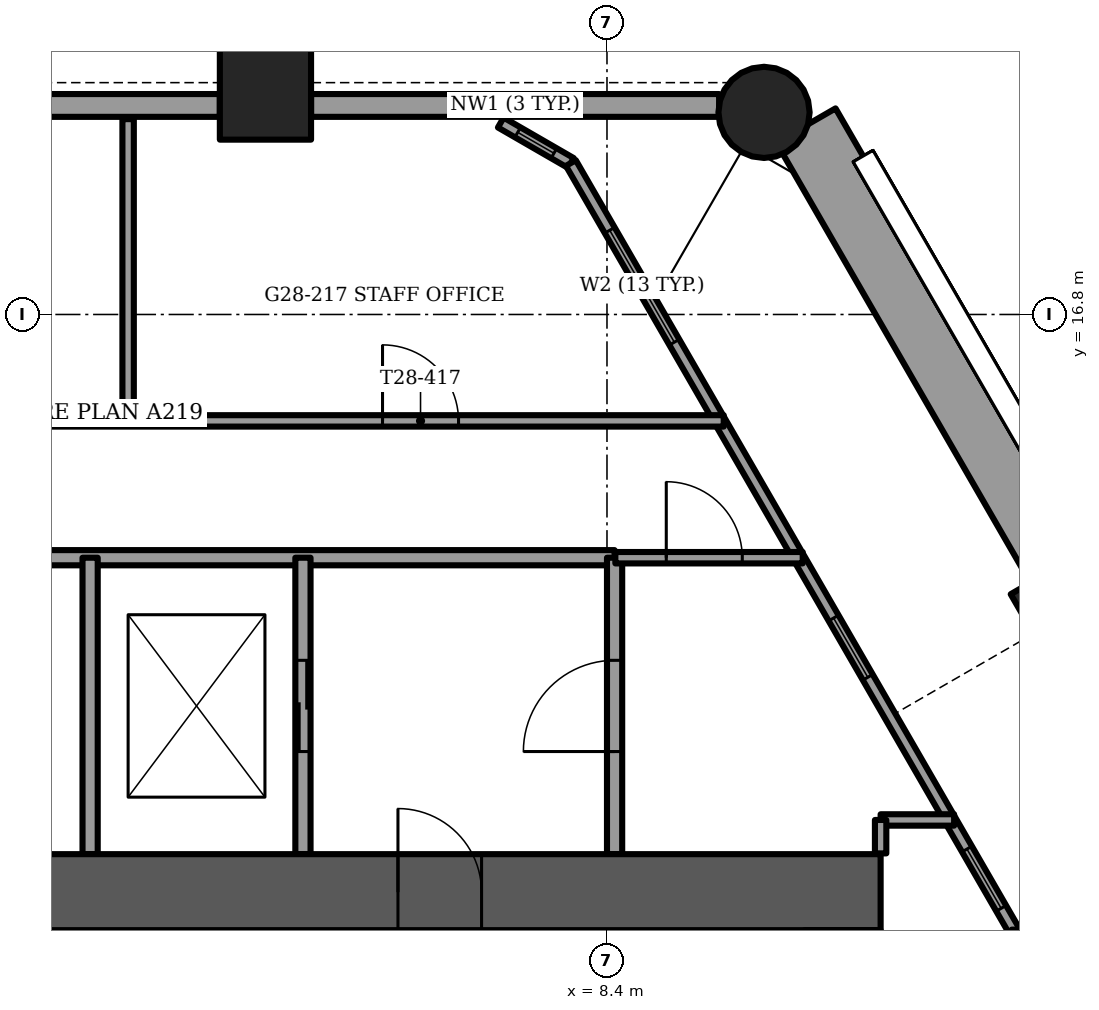
"""IFC4 building model, lengths in metres.
Left out: names, types, materials, properties, quantities, classifications, styles, units other than length and angle.
Written with IfcOpenShell. Run it as: python <this file> out.ifc"""

import sys

from ifc_helpers import new_model, si_unit, direction, frame, frame_2d, origin, origin_2d, place, context, subcontext, project, spatial, rectangle, circle, extrude, element, fill, save


model = new_model("IFC4")
c1 = context("Model", 3, precision=1e-05, world=origin(), true_north=direction((0.0, 1.0)))
c2 = subcontext(c1, "Body", "Model", "MODEL_VIEW")
j1 = project(units=[si_unit("LENGTHUNIT", "METRE"), si_unit("PLANEANGLEUNIT", "RADIAN")], contexts=[c1])
p1 = place(None, origin())
s1 = spatial("IfcSite", under=j1, at=p1, CompositionType="ELEMENT")
p2 = place(p1, origin())
s2 = spatial("IfcBuilding", under=s1, at=p2, CompositionType="ELEMENT")
p3 = place(p2, frame((0.0, 0.0, 116.0)))
s3 = spatial("IfcBuildingStorey", under=s2, at=p3, CompositionType="ELEMENT", Elevation=116.0)
p4 = place(p3, frame((10.466, 19.459, -1.2), z_axis=(0.0, 0.0, 1.0), x_axis=(1.0, 0.0, 0.0)))
e1 = element("IfcColumn", 1, at=p4, inside=s3, PredefinedType="COLUMN", context=c2, shape_type="SweptSolid", body=[
    extrude(circle(Radius=0.6, at=origin_2d()), origin(), (0.0, 0.0, 1.0), 3.75),
])
for number, where, z_axis, x_axis in (
    (2, (3.907, 19.7, -1.2), (0.0, 0.0, 1.0), (1.0, 0.0, 0.0)),
    (3, (14.531, 12.901, -1.2), (0.0, 0.0, 1.0), (0.5, -0.866, 0.0)),
):
    element("IfcColumn", number, at=place(p3, frame(where, z_axis=z_axis, x_axis=x_axis)), inside=s3, PredefinedType="COLUMN", context=c2, shape_type="SweptSolid", body=[
        extrude(rectangle(XDim=1.2, YDim=1.2, at=origin_2d()), origin(), (0.0, 0.0, 1.0), 3.75),
    ])
p5 = place(p3, frame((-12.0, 9.2, -0.3), z_axis=(0.0, 0.0, 1.0), x_axis=(1.0, 0.0, 0.0)))
e4 = element("IfcWall", 4, at=p5, inside=s3, PredefinedType="SHEAR", context=c2, shape_type="SweptSolid", body=[
    extrude(rectangle(XDim=24.0, YDim=1.0, at=frame_2d((12.0, 0.0))), origin(), (0.0, 0.0, 1.0), 3.75),
])
p6 = place(p5, frame((11.2, 0.0, 0.0)))
e5 = element("IfcOpeningElement", 5, at=p6, cuts=e4, PredefinedType="OPENING", context=c2, shape_type="SweptSolid", body=[
    extrude(rectangle(XDim=1.6, YDim=2.1, at=frame_2d((0.8, 1.05))), frame((0.0, 0.5, 0.0), z_axis=(0.0, -1.0, 0.0), x_axis=(1.0, 0.0, 0.0)), (0.0, 0.0, 1.0), 1.0),
])
p7 = place(p5, frame((5.25, 0.0, 0.0)))
e6 = element("IfcOpeningElement", 6, at=p7, cuts=e4, PredefinedType="OPENING", context=c2, shape_type="SweptSolid", body=[
    extrude(rectangle(XDim=1.1, YDim=2.1, at=frame_2d((0.55, 1.05))), frame((0.0, 0.5, 0.0), z_axis=(0.0, -1.0, 0.0), x_axis=(1.0, 0.0, 0.0)), (0.0, 0.0, 1.0), 1.0),
])
p8 = place(p5, frame((17.65, 0.0, 0.0)))
e7 = element("IfcOpeningElement", 7, at=p8, cuts=e4, PredefinedType="OPENING", context=c2, shape_type="SweptSolid", body=[
    extrude(rectangle(XDim=1.1, YDim=2.1, at=frame_2d((0.55, 1.05))), frame((0.0, 0.5, 0.0), z_axis=(0.0, -1.0, 0.0), x_axis=(1.0, 0.0, 0.0)), (0.0, 0.0, 1.0), 1.0),
])
p9 = place(p3, frame((14.376, 13.469, 0.0), z_axis=(0.0, 0.0, 1.0), x_axis=(-0.500012951941, 0.866017925849, 0.0)))
e8 = element("IfcWall", 8, at=p9, inside=s3, PredefinedType="PARAPET", context=c2, shape_type="SweptSolid", body=[
    extrude(rectangle(XDim=6.717, YDim=0.9, at=frame_2d((3.358, 0.0))), origin(), (0.0, 0.0, 1.0), 1.1),
])
p10 = place(p3, frame((9.875, 19.55, 0.0), z_axis=(0.0, 0.0, 1.0), x_axis=(-1.0, 0.0, 0.0)))
e9 = element("IfcWall", 9, at=p10, inside=s3, PredefinedType="SOLIDWALL", context=c2, shape_type="SweptSolid", body=[
    extrude(rectangle(XDim=5.368, YDim=0.3, at=frame_2d((2.684, 0.0))), origin(), (0.0, 0.0, 1.0), 2.55),
])
p11 = place(p3, frame((3.307, 19.55, 0.0), z_axis=(0.0, 0.0, 1.0), x_axis=(-1.0, 0.0, 0.0)))
e10 = element("IfcWall", 10, at=p11, inside=s3, PredefinedType="SOLIDWALL", context=c2, shape_type="SweptSolid", body=[
    extrude(rectangle(XDim=6.613, YDim=0.3, at=frame_2d((3.307, 0.0))), origin(), (0.0, 0.0, 1.0), 2.55),
])
p12 = place(p11, frame((3.507, 0.0, 0.15)))
e11 = element("IfcOpeningElement", 11, at=p12, cuts=e10, PredefinedType="OPENING", context=c2, shape_type="SweptSolid", body=[
    extrude(rectangle(XDim=0.9, YDim=2.15, at=frame_2d((0.45, 1.075))), frame((0.0, 0.15, 0.0), z_axis=(0.0, -1.0, 0.0), x_axis=(1.0, 0.0, 0.0)), (0.0, 0.0, 1.0), 0.3),
])
p13 = place(p3, frame((18.852, -0.133, 0.0), z_axis=(0.0, 0.0, 1.0), x_axis=(-0.499994842654, 0.866028381359, 0.0)))
e12 = element("IfcWall", 12, at=p13, inside=s3, PredefinedType="SOLIDWALL", context=c2, shape_type="SweptSolid", body=[
    extrude(rectangle(XDim=21.853, YDim=0.15, at=frame_2d((10.927, 0.0))), origin(), (0.0, 0.0, 1.0), 3.45),
])
p14 = place(p13, frame((1.441, 0.0, 0.15)))
e13 = element("IfcOpeningElement", 13, at=p14, cuts=e12, PredefinedType="OPENING", context=c2, shape_type="SweptSolid", body=[
    extrude(rectangle(XDim=1.7, YDim=2.85, at=frame_2d((0.85, 1.425))), frame((0.0, 0.075, 0.0), z_axis=(0.0, -1.0, 0.0), x_axis=(1.0, 0.0, 0.0)), (0.0, 0.0, 1.0), 0.15),
])
p15 = place(p13, frame((3.541, 0.0, 0.15)))
e14 = element("IfcOpeningElement", 14, at=p15, cuts=e12, PredefinedType="OPENING", context=c2, shape_type="SweptSolid", body=[
    extrude(rectangle(XDim=1.5, YDim=2.85, at=frame_2d((0.75, 1.425))), frame((0.0, 0.075, 0.0), z_axis=(0.0, -1.0, 0.0), x_axis=(1.0, 0.0, 0.0)), (0.0, 0.0, 1.0), 0.15),
])
p16 = place(p13, frame((5.641, 0.0, 0.15)))
e15 = element("IfcOpeningElement", 15, at=p16, cuts=e12, PredefinedType="OPENING", context=c2, shape_type="SweptSolid", body=[
    extrude(rectangle(XDim=1.7, YDim=2.85, at=frame_2d((0.85, 1.425))), frame((0.0, 0.075, 0.0), z_axis=(0.0, -1.0, 0.0), x_axis=(1.0, 0.0, 0.0)), (0.0, 0.0, 1.0), 0.15),
])
p17 = place(p13, frame((7.741, 0.0, 0.15)))
e16 = element("IfcOpeningElement", 16, at=p17, cuts=e12, PredefinedType="OPENING", context=c2, shape_type="SweptSolid", body=[
    extrude(rectangle(XDim=1.5, YDim=2.85, at=frame_2d((0.75, 1.425))), frame((0.0, 0.075, 0.0), z_axis=(0.0, -1.0, 0.0), x_axis=(1.0, 0.0, 0.0)), (0.0, 0.0, 1.0), 0.15),
])
p18 = place(p13, frame((10.531, 0.0, 0.15)))
e17 = element("IfcOpeningElement", 17, at=p18, cuts=e12, PredefinedType="OPENING", context=c2, shape_type="SweptSolid", body=[
    extrude(rectangle(XDim=0.9, YDim=2.85, at=frame_2d((0.45, 1.425))), frame((0.0, 0.075, 0.0), z_axis=(0.0, -1.0, 0.0), x_axis=(1.0, 0.0, 0.0)), (0.0, 0.0, 1.0), 0.15),
])
p19 = place(p13, frame((14.041, 0.0, 0.15)))
e18 = element("IfcOpeningElement", 18, at=p19, cuts=e12, PredefinedType="OPENING", context=c2, shape_type="SweptSolid", body=[
    extrude(rectangle(XDim=0.9, YDim=2.85, at=frame_2d((0.45, 1.425))), frame((0.0, 0.075, 0.0), z_axis=(0.0, -1.0, 0.0), x_axis=(1.0, 0.0, 0.0)), (0.0, 0.0, 1.0), 0.15),
])
p20 = place(p13, frame((19.132, 0.0, 0.15)))
e19 = element("IfcOpeningElement", 19, at=p20, cuts=e12, PredefinedType="OPENING", context=c2, shape_type="SweptSolid", body=[
    extrude(rectangle(XDim=1.7, YDim=2.73, at=frame_2d((0.85, 1.365))), frame((0.0, 0.075, 0.0), z_axis=(0.0, -1.0, 0.0), x_axis=(1.0, 0.0, 0.0)), (0.0, 0.0, 1.0), 0.15),
])
p21 = place(p3, frame((7.925, 18.792, 0.0), z_axis=(0.0, 0.0, 1.0), x_axis=(-0.866048165231, 0.499960573946, 0.0)))
e20 = element("IfcWall", 20, at=p21, inside=s3, PredefinedType="SOLIDWALL", context=c2, shape_type="SweptSolid", body=[
    extrude(rectangle(XDim=1.065, YDim=0.15, at=frame_2d((0.532, 0.0))), origin(), (0.0, 0.0, 1.0), 3.45),
])
p22 = place(p21, frame((0.258, 0.0, 0.15)))
e21 = element("IfcOpeningElement", 21, at=p22, cuts=e20, PredefinedType="OPENING", context=c2, shape_type="SweptSolid", body=[
    extrude(rectangle(XDim=0.55, YDim=2.85, at=frame_2d((0.275, 1.425))), frame((0.0, 0.075, 0.0), z_axis=(0.0, -1.0, 0.0), x_axis=(1.0, 0.0, 0.0)), (0.0, 0.0, 1.0), 0.15),
])
p23 = place(p3, frame((-8.5, 13.6, 0.0), z_axis=(0.0, 0.0, 1.0), x_axis=(1.0, 0.0, 0.0)))
e22 = element("IfcWall", 22, at=p23, inside=s3, PredefinedType="PARTITIONING", context=c2, shape_type="SweptSolid", body=[
    extrude(rectangle(XDim=17.0, YDim=0.2, at=frame_2d((8.5, 0.0))), origin(), (0.0, 0.0, 1.0), 3.45),
])
p24 = place(p23, frame((8.0, 0.0, 0.0)))
e23 = element("IfcOpeningElement", 23, at=p24, cuts=e22, PredefinedType="OPENING", context=c2, shape_type="SweptSolid", body=[
    extrude(rectangle(XDim=1.0, YDim=2.1, at=frame_2d((0.5, 1.05))), frame((0.0, 0.1, 0.0), z_axis=(0.0, -1.0, 0.0), x_axis=(1.0, 0.0, 0.0)), (0.0, 0.0, 1.0), 0.2),
])
p25 = place(p3, frame((8.5, 9.7, 0.0), z_axis=(0.0, 0.0, 1.0), x_axis=(0.0, 1.0, 0.0)))
e24 = element("IfcWall", 24, at=p25, inside=s3, PredefinedType="PARTITIONING", context=c2, shape_type="SweptSolid", body=[
    extrude(rectangle(XDim=3.9, YDim=0.2, at=frame_2d((1.95, 0.0))), origin(), (0.0, 0.0, 1.0), 3.45),
])
p26 = place(p25, frame((1.35, 0.0, 0.0)))
e25 = element("IfcOpeningElement", 25, at=p26, cuts=e24, PredefinedType="OPENING", context=c2, shape_type="SweptSolid", body=[
    extrude(rectangle(XDim=1.2, YDim=2.1, at=frame_2d((0.6, 1.05))), frame((0.0, 0.1, 0.0), z_axis=(0.0, -1.0, 0.0), x_axis=(1.0, 0.0, 0.0)), (0.0, 0.0, 1.0), 0.2),
])
p27 = place(p3, frame((4.4, 9.7, 0.0), z_axis=(0.0, 0.0, 1.0), x_axis=(0.0, 1.0, 0.0)))
e26 = element("IfcWall", 26, at=p27, inside=s3, PredefinedType="PARTITIONING", context=c2, shape_type="SweptSolid", body=[
    extrude(rectangle(XDim=3.9, YDim=0.2, at=frame_2d((1.95, 0.0))), origin(), (0.0, 0.0, 1.0), 3.45),
])
p28 = place(p27, frame((1.35, 0.0, 0.0)))
e27 = element("IfcOpeningElement", 27, at=p28, cuts=e26, PredefinedType="OPENING", context=c2, shape_type="SweptSolid", body=[
    extrude(rectangle(XDim=1.2, YDim=2.1, at=frame_2d((0.6, 1.05))), frame((0.0, 0.1, 0.0), z_axis=(0.0, -1.0, 0.0), x_axis=(1.0, 0.0, 0.0)), (0.0, 0.0, 1.0), 0.2),
])
p29 = place(p3, frame((1.6, 9.7, 0.0), z_axis=(0.0, 0.0, 1.0), x_axis=(0.0, 1.0, 0.0)))
e28 = element("IfcWall", 28, at=p29, inside=s3, PredefinedType="PARTITIONING", context=c2, shape_type="SweptSolid", body=[
    extrude(rectangle(XDim=3.9, YDim=0.2, at=frame_2d((1.95, 0.0))), origin(), (0.0, 0.0, 1.0), 3.45),
])
p30 = place(p3, frame((12.0, 10.15, 0.0), z_axis=(0.0, 0.0, 1.0), x_axis=(1.0, 0.0, 0.0)))
e29 = element("IfcWall", 29, at=p30, inside=s3, PredefinedType="PARTITIONING", context=c2, shape_type="SweptSolid", body=[
    extrude(rectangle(XDim=0.967, YDim=0.15, at=frame_2d((0.483, 0.0))), origin(), (0.0, 0.0, 1.0), 3.45),
])
p31 = place(p3, frame((8.51, 13.6, 0.0), z_axis=(0.0, 0.0, 1.0), x_axis=(1.0, 0.0, 0.0)))
e30 = element("IfcWall", 30, at=p31, inside=s3, PredefinedType="PARTITIONING", context=c2, shape_type="SweptSolid", body=[
    extrude(rectangle(XDim=2.465, YDim=0.15, at=frame_2d((1.232, 0.0))), origin(), (0.0, 0.0, 1.0), 3.45),
])
p32 = place(p31, frame((0.67, 0.0, 0.0)))
e31 = element("IfcOpeningElement", 31, at=p32, cuts=e30, PredefinedType="OPENING", context=c2, shape_type="SweptSolid", body=[
    extrude(rectangle(XDim=1.0, YDim=2.1, at=frame_2d((0.5, 1.05))), frame((0.0, 0.075, 0.0), z_axis=(0.0, -1.0, 0.0), x_axis=(1.0, 0.0, 0.0)), (0.0, 0.0, 1.0), 0.15),
])
p33 = place(p3, frame((-9.936, 15.4, 0.0), z_axis=(0.0, 0.0, 1.0), x_axis=(1.0, 0.0, 0.0)))
e32 = element("IfcWall", 32, at=p33, inside=s3, PredefinedType="PARTITIONING", context=c2, shape_type="SweptSolid", body=[
    extrude(rectangle(XDim=19.872, YDim=0.15, at=frame_2d((9.936, 0.0))), origin(), (0.0, 0.0, 1.0), 3.45),
])
p34 = place(p33, frame((1.118, 0.0, 0.0)))
e33 = element("IfcOpeningElement", 33, at=p34, cuts=e32, PredefinedType="OPENING", context=c2, shape_type="SweptSolid", body=[
    extrude(rectangle(XDim=1.0, YDim=2.1, at=frame_2d((0.5, 1.05))), frame((0.0, 0.075, 0.0), z_axis=(0.0, -1.0, 0.0), x_axis=(1.0, 0.0, 0.0)), (0.0, 0.0, 1.0), 0.15),
])
p35 = place(p33, frame((8.596, 0.0, 0.0)))
e34 = element("IfcOpeningElement", 34, at=p35, cuts=e32, PredefinedType="OPENING", context=c2, shape_type="SweptSolid", body=[
    extrude(rectangle(XDim=1.0, YDim=2.1, at=frame_2d((0.5, 1.05))), frame((0.0, 0.075, 0.0), z_axis=(0.0, -1.0, 0.0), x_axis=(1.0, 0.0, 0.0)), (0.0, 0.0, 1.0), 0.15),
])
p36 = place(p33, frame((15.383, 0.0, 0.0)))
e35 = element("IfcOpeningElement", 35, at=p36, cuts=e32, PredefinedType="OPENING", context=c2, shape_type="SweptSolid", body=[
    extrude(rectangle(XDim=1.0, YDim=2.1, at=frame_2d((0.5, 1.05))), frame((0.0, 0.075, 0.0), z_axis=(0.0, -1.0, 0.0), x_axis=(1.0, 0.0, 0.0)), (0.0, 0.0, 1.0), 0.15),
])
p37 = place(p3, frame((13.8, -3.7, 0.0), z_axis=(0.0, 0.0, 1.0), x_axis=(0.0, 1.0, 0.0)))
e36 = element("IfcWall", 36, at=p37, inside=s3, PredefinedType="PARTITIONING", context=c2, shape_type="SweptSolid", body=[
    extrude(rectangle(XDim=12.407, YDim=0.15, at=frame_2d((6.204, 0.0))), origin(), (0.0, 0.0, 1.0), 3.45),
])
p38 = place(p37, frame((1.6, 0.0, 0.0)))
e37 = element("IfcOpeningElement", 37, at=p38, cuts=e36, PredefinedType="OPENING", context=c2, shape_type="SweptSolid", body=[
    extrude(rectangle(XDim=1.0, YDim=2.1, at=frame_2d((0.5, 1.05))), frame((0.0, 0.075, 0.0), z_axis=(0.0, -1.0, 0.0), x_axis=(1.0, 0.0, 0.0)), (0.0, 0.0, 1.0), 0.15),
])
p39 = place(p37, frame((7.683, 0.0, 0.0)))
e38 = element("IfcOpeningElement", 38, at=p39, cuts=e36, PredefinedType="OPENING", context=c2, shape_type="SweptSolid", body=[
    extrude(rectangle(XDim=1.0, YDim=2.1, at=frame_2d((0.5, 1.05))), frame((0.0, 0.075, 0.0), z_axis=(0.0, -1.0, 0.0), x_axis=(1.0, 0.0, 0.0)), (0.0, 0.0, 1.0), 0.15),
])
p40 = place(p3, frame((12.0, 9.71, 0.0), z_axis=(0.0, 0.0, 1.0), x_axis=(0.0, 1.0, 0.0)))
e39 = element("IfcWall", 39, at=p40, inside=s3, PredefinedType="PARTITIONING", context=c2, shape_type="SweptSolid", body=[
    extrude(rectangle(XDim=0.44, YDim=0.15, at=frame_2d((0.22, 0.0))), origin(), (0.0, 0.0, 1.0), 3.45),
])
p41 = place(p3, frame((2.1, 15.4, 0.0), z_axis=(0.0, 0.0, 1.0), x_axis=(0.0, 1.0, 0.0)))
e40 = element("IfcWall", 40, at=p41, inside=s3, PredefinedType="PARTITIONING", context=c2, shape_type="SweptSolid", body=[
    extrude(rectangle(XDim=3.97, YDim=0.15, at=frame_2d((1.985, 0.0))), origin(), (0.0, 0.0, 1.0), 3.45),
])
p42 = place(p18, origin())
e41 = element("IfcWindow", 41, at=p42, inside=s3, PartitioningType="SINGLE_PANEL", PredefinedType="WINDOW", context=c2, shape_type="SweptSolid", body=[
    extrude(rectangle(XDim=0.9, YDim=2.85, at=frame_2d((0.45, 1.425))), frame((0.0, 0.03, 0.0), z_axis=(0.0, -1.0, 0.0), x_axis=(1.0, 0.0, 0.0)), (0.0, 0.0, 1.0), 0.06),
])
fill(e17, e41)
p43 = place(p19, origin())
e42 = element("IfcWindow", 42, at=p43, inside=s3, PartitioningType="SINGLE_PANEL", PredefinedType="WINDOW", context=c2, shape_type="SweptSolid", body=[
    extrude(rectangle(XDim=0.9, YDim=2.85, at=frame_2d((0.45, 1.425))), frame((0.0, 0.03, 0.0), z_axis=(0.0, -1.0, 0.0), x_axis=(1.0, 0.0, 0.0)), (0.0, 0.0, 1.0), 0.06),
])
fill(e18, e42)
p44 = place(p20, origin())
e43 = element("IfcWindow", 43, at=p44, inside=s3, PartitioningType="SINGLE_PANEL", PredefinedType="WINDOW", context=c2, shape_type="SweptSolid", body=[
    extrude(rectangle(XDim=1.7, YDim=2.73, at=frame_2d((0.85, 1.365))), frame((0.0, 0.03, 0.0), z_axis=(0.0, -1.0, 0.0), x_axis=(1.0, 0.0, 0.0)), (0.0, 0.0, 1.0), 0.06),
])
fill(e19, e43)
p45 = place(p22, origin())
e44 = element("IfcWindow", 44, at=p45, inside=s3, PartitioningType="SINGLE_PANEL", PredefinedType="WINDOW", context=c2, shape_type="SweptSolid", body=[
    extrude(rectangle(XDim=0.55, YDim=2.85, at=frame_2d((0.275, 1.425))), frame((0.0, 0.03, 0.0), z_axis=(0.0, -1.0, 0.0), x_axis=(1.0, 0.0, 0.0)), (0.0, 0.0, 1.0), 0.06),
])
fill(e21, e44)
p46 = place(p8, origin())
e45 = element("IfcDoor", 45, at=p46, inside=s3, OperationType="SINGLE_SWING_RIGHT", PredefinedType="DOOR", context=c2, shape_type="SweptSolid", body=[
    extrude(rectangle(XDim=1.1, YDim=2.1, at=frame_2d((0.55, 1.05))), frame((0.0, 0.025, 0.0), z_axis=(0.0, -1.0, 0.0), x_axis=(1.0, 0.0, 0.0)), (0.0, 0.0, 1.0), 0.05),
])
fill(e7, e45)
p47 = place(p28, origin())
e46 = element("IfcDoor", 46, at=p47, inside=s3, OperationType="SLIDING_TO_LEFT", PredefinedType="DOOR", context=c2, shape_type="SweptSolid", body=[
    extrude(rectangle(XDim=1.2, YDim=2.1, at=frame_2d((0.6, 1.05))), frame((0.0, 0.025, 0.0), z_axis=(0.0, -1.0, 0.0), x_axis=(1.0, 0.0, 0.0)), (0.0, 0.0, 1.0), 0.05),
])
fill(e27, e46)
p48 = place(p26, origin())
e47 = element("IfcDoor", 47, at=p48, inside=s3, OperationType="SINGLE_SWING_LEFT", PredefinedType="DOOR", context=c2, shape_type="SweptSolid", body=[
    extrude(rectangle(XDim=1.2, YDim=2.1, at=frame_2d((0.6, 1.05))), frame((0.0, 0.025, 0.0), z_axis=(0.0, -1.0, 0.0), x_axis=(1.0, 0.0, 0.0)), (0.0, 0.0, 1.0), 0.05),
])
fill(e25, e47)
p49 = place(p36, origin())
e48 = element("IfcDoor", 48, at=p49, inside=s3, OperationType="SINGLE_SWING_LEFT", PredefinedType="DOOR", context=c2, shape_type="SweptSolid", body=[
    extrude(rectangle(XDim=1.0, YDim=2.1, at=frame_2d((0.5, 1.05))), frame((0.0, 0.025, 0.0), z_axis=(0.0, -1.0, 0.0), x_axis=(1.0, 0.0, 0.0)), (0.0, 0.0, 1.0), 0.05),
])
fill(e35, e48)
p50 = place(p32, origin())
e49 = element("IfcDoor", 49, at=p50, inside=s3, OperationType="SINGLE_SWING_LEFT", PredefinedType="DOOR", context=c2, shape_type="SweptSolid", body=[
    extrude(rectangle(XDim=1.0, YDim=2.1, at=frame_2d((0.5, 1.05))), frame((0.0, 0.025, 0.0), z_axis=(0.0, -1.0, 0.0), x_axis=(1.0, 0.0, 0.0)), (0.0, 0.0, 1.0), 0.05),
])
fill(e31, e49)
save(model, sys.argv[1])
